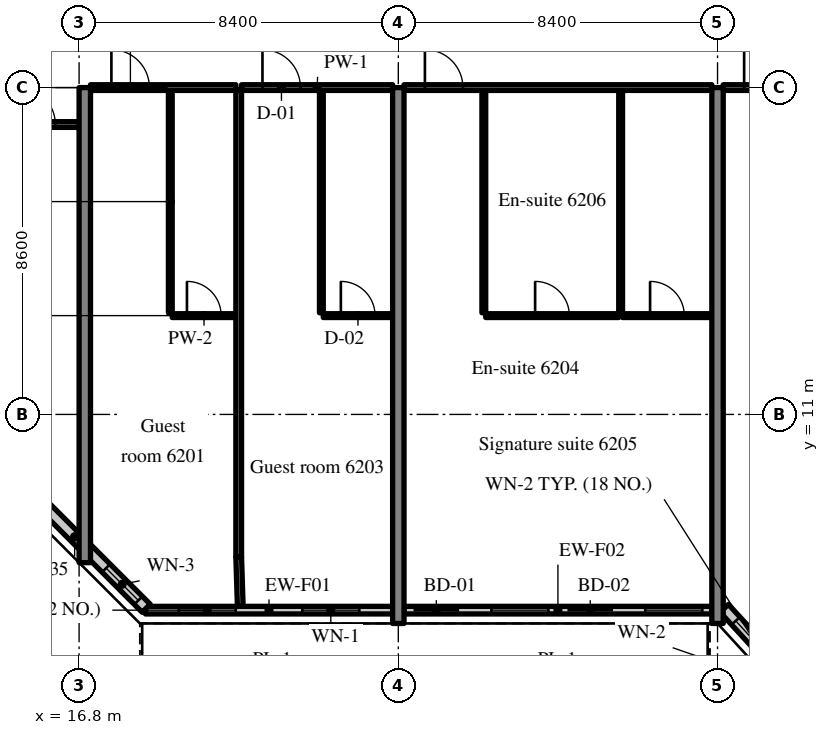
"""IFC4 building model, lengths in metres.
Left out: names, types, materials, properties, quantities, classifications, styles, units other than length and angle.
Written with IfcOpenShell. Run it as: python <this file> out.ifc"""

import sys

from ifc_helpers import new_model, si_unit, direction, frame, frame_2d, origin, place, context, subcontext, project, spatial, rectangle, extrude, source, transform, mapped, element, fill, save


model = new_model("IFC4")
c1 = context("Model", 3, precision=1e-05, world=origin(), true_north=direction((0.0, 1.0)))
c2 = subcontext(c1, "Body", "Model", "MODEL_VIEW")
j1 = project(units=[si_unit("LENGTHUNIT", "METRE"), si_unit("PLANEANGLEUNIT", "RADIAN")], contexts=[c1])
p1 = place(None, origin())
s1 = spatial("IfcSite", under=j1, at=p1, CompositionType="ELEMENT")
p2 = place(p1, origin())
s2 = spatial("IfcBuilding", under=s1, at=p2, CompositionType="ELEMENT")
p3 = place(p2, frame((0.0, 0.0, 256.9)))
s3 = spatial("IfcBuildingStorey", under=s2, at=p3, CompositionType="ELEMENT", Elevation=256.9)
m1 = source(origin(), c2, "Body", "SweptSolid", [
    extrude(rectangle(XDim=12.5, YDim=0.3, at=frame_2d((6.25, 0.0))), origin(), (0.0, 0.0, 1.0), 3.62),
])
p4 = place(p3, frame((16.95, 7.1, 0.0), z_axis=(0.0, 0.0, 1.0), x_axis=(0.0, 1.0, 0.0)))
e1 = element("IfcWall", 1, at=p4, inside=s3, PredefinedType="SHEAR", context=c2, shape_type="MappedRepresentation", body=[
    mapped(m1, transform((0.0, 0.0, 0.0), scale=1.0)),
])
m2 = source(origin(), c2, "Body", "SweptSolid", [
    extrude(rectangle(XDim=14.1, YDim=0.3, at=frame_2d((7.05, 0.0))), origin(), (0.0, 0.0, 1.0), 3.62),
])
for number, where, z_axis, x_axis in (
    (2, (25.2, 5.5, 0.0), (0.0, 0.0, 1.0), (0.0, 1.0, 0.0)),
    (3, (33.6, 5.5, 0.0), (0.0, 0.0, 1.0), (0.0, 1.0, 0.0)),
):
    element("IfcWall", number, at=place(p3, frame(where, z_axis=z_axis, x_axis=x_axis)), inside=s3, PredefinedType="SHEAR", context=c2, shape_type="MappedRepresentation", body=[
        mapped(m2, transform((0.0, 0.0, 0.0), scale=1.0)),
    ])
m3 = source(origin(), c2, "Body", "SweptSolid", [
    extrude(rectangle(XDim=6.505, YDim=0.2, at=frame_2d((3.252, 0.0))), origin(), (0.0, 0.0, 1.0), 3.02),
])
p5 = place(p3, frame((18.545, 5.85, 0.0), z_axis=(0.0, 0.0, 1.0), x_axis=(1.0, 0.0, 0.0)))
e4 = element("IfcWall", 4, at=p5, inside=s3, PredefinedType="SOLIDWALL", context=c2, shape_type="MappedRepresentation", body=[
    mapped(m3, transform((0.0, 0.0, 0.0), scale=1.0)),
])
m4 = source(origin(), c2, "Body", "SweptSolid", [
    extrude(rectangle(XDim=1.5, YDim=1.5, at=frame_2d((0.75, 0.75))), frame((0.0, 0.11, 0.0), z_axis=(0.0, -1.0, 0.0), x_axis=(1.0, 0.0, 0.0)), (0.0, 0.0, 1.0), 0.22),
])
p6 = place(p5, frame((0.876, 0.0, 0.9)))
e5 = element("IfcOpeningElement", 5, at=p6, cuts=e4, PredefinedType="OPENING", context=c2, shape_type="MappedRepresentation", body=[
    mapped(m4, transform((0.0, 0.0, 0.0), scale=1.0)),
])
p7 = place(p5, frame((4.129, 0.0, 0.9)))
e6 = element("IfcOpeningElement", 6, at=p7, cuts=e4, PredefinedType="OPENING", context=c2, shape_type="MappedRepresentation", body=[
    mapped(m4, transform((0.0, 0.0, 0.0), scale=1.0)),
])
m5 = source(origin(), c2, "Body", "SweptSolid", [
    extrude(rectangle(XDim=8.1, YDim=0.2, at=frame_2d((4.05, 0.0))), origin(), (0.0, 0.0, 1.0), 3.02),
])
p8 = place(p3, frame((25.35, 5.85, 0.0), z_axis=(0.0, 0.0, 1.0), x_axis=(1.0, 0.0, 0.0)))
e7 = element("IfcWall", 7, at=p8, inside=s3, PredefinedType="SOLIDWALL", context=c2, shape_type="MappedRepresentation", body=[
    mapped(m5, transform((0.0, 0.0, 0.0), scale=1.0)),
])
m6 = source(origin(), c2, "Body", "SweptSolid", [
    extrude(rectangle(XDim=1.2, YDim=2.4, at=frame_2d((0.6, 1.2))), frame((0.0, 0.11, 0.0), z_axis=(0.0, -1.0, 0.0), x_axis=(1.0, 0.0, 0.0)), (0.0, 0.0, 1.0), 0.22),
])
p9 = place(p8, frame((0.25, 0.0, 0.0)))
e8 = element("IfcOpeningElement", 8, at=p9, cuts=e7, PredefinedType="OPENING", context=c2, shape_type="MappedRepresentation", body=[
    mapped(m6, transform((0.0, 0.0, 0.0), scale=1.0)),
])
p10 = place(p8, frame((2.3, 0.0, 0.9)))
e9 = element("IfcOpeningElement", 9, at=p10, cuts=e7, PredefinedType="OPENING", context=c2, shape_type="MappedRepresentation", body=[
    mapped(m4, transform((0.0, 0.0, 0.0), scale=1.0)),
])
p11 = place(p8, frame((4.3, 0.0, 0.0)))
e10 = element("IfcOpeningElement", 10, at=p11, cuts=e7, PredefinedType="OPENING", context=c2, shape_type="MappedRepresentation", body=[
    mapped(m6, transform((0.0, 0.0, 0.0), scale=1.0)),
])
p12 = place(p8, frame((6.35, 0.0, 0.9)))
e11 = element("IfcOpeningElement", 11, at=p12, cuts=e7, PredefinedType="OPENING", context=c2, shape_type="MappedRepresentation", body=[
    mapped(m4, transform((0.0, 0.0, 0.0), scale=1.0)),
])
m7 = source(origin(), c2, "Body", "SweptSolid", [
    extrude(rectangle(XDim=2.398, YDim=0.3, at=frame_2d((1.199, 0.0))), origin(), (0.0, 0.0, 1.0), 3.62),
])
p13 = place(p3, frame((33.776, 5.9, 0.0), z_axis=(0.0, 0.0, 1.0), x_axis=(0.675374189419, -0.737475222815, 0.0)))
e12 = element("IfcWall", 12, at=p13, inside=s3, PredefinedType="SOLIDWALL", context=c2, shape_type="MappedRepresentation", body=[
    mapped(m7, transform((0.0, 0.0, 0.0), scale=1.0)),
])
m8 = source(origin(), c2, "Body", "SweptSolid", [
    extrude(rectangle(XDim=1.5, YDim=2.0, at=frame_2d((0.75, 1.0))), frame((0.0, 0.16, 0.0), z_axis=(0.0, -1.0, 0.0), x_axis=(1.0, 0.0, 0.0)), (0.0, 0.0, 1.0), 0.32),
])
p14 = place(p13, frame((0.449, 0.0, 0.9)))
e13 = element("IfcOpeningElement", 13, at=p14, cuts=e12, PredefinedType="OPENING", context=c2, shape_type="MappedRepresentation", body=[
    mapped(m8, transform((0.0, 0.0, 0.0), scale=1.0)),
])
m9 = source(origin(), c2, "Body", "SweptSolid", [
    extrude(rectangle(XDim=5.326, YDim=0.3, at=frame_2d((2.663, 0.0))), origin(), (0.0, 0.0, 1.0), 3.62),
])
p15 = place(p3, frame((14.8, 9.666, 0.0), z_axis=(0.0, 0.0, 1.0), x_axis=(0.707083859269, -0.707129702361, 0.0)))
e14 = element("IfcWall", 14, at=p15, inside=s3, PredefinedType="SOLIDWALL", context=c2, shape_type="MappedRepresentation", body=[
    mapped(m9, transform((0.0, 0.0, 0.0), scale=1.0)),
])
m10 = source(origin(), c2, "Body", "SweptSolid", [
    extrude(rectangle(XDim=1.2, YDim=1.5, at=frame_2d((0.6, 0.75))), frame((0.0, 0.16, 0.0), z_axis=(0.0, -1.0, 0.0), x_axis=(1.0, 0.0, 0.0)), (0.0, 0.0, 1.0), 0.32),
])
p16 = place(p15, frame((3.833, 0.0, 0.9)))
e15 = element("IfcOpeningElement", 15, at=p16, cuts=e14, PredefinedType="OPENING", context=c2, shape_type="MappedRepresentation", body=[
    mapped(m10, transform((0.0, 0.0, 0.0), scale=1.0)),
])
m11 = source(origin(), c2, "Body", "SweptSolid", [
    extrude(rectangle(XDim=5.85, YDim=0.1, at=frame_2d((2.925, 0.0))), origin(), (0.0, 0.0, 1.0), 3.62),
])
p17 = place(p3, frame((19.2, 13.675, 0.0), z_axis=(0.0, 0.0, 1.0), x_axis=(0.0, 1.0, 0.0)))
e16 = element("IfcWall", 16, at=p17, inside=s3, PredefinedType="PARTITIONING", context=c2, shape_type="MappedRepresentation", body=[
    mapped(m11, transform((0.0, 0.0, 0.0), scale=1.0)),
])
m12 = source(origin(), c2, "Body", "SweptSolid", [
    extrude(rectangle(XDim=1.675, YDim=0.1, at=frame_2d((0.837, 0.0))), origin(), (0.0, 0.0, 1.0), 3.62),
])
p18 = place(p3, frame((19.25, 13.6, 0.0), z_axis=(0.0, 0.0, 1.0), x_axis=(1.0, 0.0, 0.0)))
e17 = element("IfcWall", 17, at=p18, inside=s3, PredefinedType="PARTITIONING", context=c2, shape_type="MappedRepresentation", body=[
    mapped(m12, transform((0.0, 0.0, 0.0), scale=1.0)),
])
m13 = source(origin(), c2, "Body", "SweptSolid", [
    extrude(rectangle(XDim=0.9, YDim=2.1, at=frame_2d((0.45, 1.05))), frame((0.0, 0.06, 0.0), z_axis=(0.0, -1.0, 0.0), x_axis=(1.0, 0.0, 0.0)), (0.0, 0.0, 1.0), 0.12),
])
p19 = place(p18, frame((0.388, 0.0, 0.0)))
e18 = element("IfcOpeningElement", 18, at=p19, cuts=e17, PredefinedType="OPENING", context=c2, shape_type="MappedRepresentation", body=[
    mapped(m13, transform((0.0, 0.0, 0.0), scale=1.0)),
])
m14 = source(origin(), c2, "Body", "SweptSolid", [
    extrude(rectangle(XDim=3.825, YDim=0.15, at=frame_2d((1.913, 0.0))), origin(), (0.0, 0.0, 1.0), 2.92),
])
p20 = place(p3, frame((17.1, 19.6, 0.0), z_axis=(0.0, 0.0, 1.0), x_axis=(1.0, 0.0, 0.0)))
e19 = element("IfcWall", 19, at=p20, inside=s3, PredefinedType="PARTITIONING", context=c2, shape_type="MappedRepresentation", body=[
    mapped(m14, transform((0.0, 0.0, 0.0), scale=1.0)),
])
m15 = source(origin(), c2, "Body", "SweptSolid", [
    extrude(rectangle(XDim=1.0, YDim=2.1, at=frame_2d((0.5, 1.05))), frame((0.0, 0.085, 0.0), z_axis=(0.0, -1.0, 0.0), x_axis=(1.0, 0.0, 0.0)), (0.0, 0.0, 1.0), 0.17),
])
p21 = place(p20, frame((0.55, 0.0, 0.0)))
e20 = element("IfcOpeningElement", 20, at=p21, cuts=e19, PredefinedType="OPENING", context=c2, shape_type="MappedRepresentation", body=[
    mapped(m15, transform((0.0, 0.0, 0.0), scale=1.0)),
])
p22 = place(p3, frame((23.175, 13.675, 0.0), z_axis=(0.0, 0.0, 1.0), x_axis=(0.0, 1.0, 0.0)))
e21 = element("IfcWall", 21, at=p22, inside=s3, PredefinedType="PARTITIONING", context=c2, shape_type="MappedRepresentation", body=[
    mapped(m11, transform((0.0, 0.0, 0.0), scale=1.0)),
])
m16 = source(origin(), c2, "Body", "SweptSolid", [
    extrude(rectangle(XDim=1.825, YDim=0.1, at=frame_2d((0.913, 0.0))), origin(), (0.0, 0.0, 1.0), 3.62),
])
p23 = place(p3, frame((23.225, 13.6, 0.0), z_axis=(0.0, 0.0, 1.0), x_axis=(1.0, 0.0, 0.0)))
e22 = element("IfcWall", 22, at=p23, inside=s3, PredefinedType="PARTITIONING", context=c2, shape_type="MappedRepresentation", body=[
    mapped(m16, transform((0.0, 0.0, 0.0), scale=1.0)),
])
p24 = place(p23, frame((0.463, 0.0, 0.0)))
e23 = element("IfcOpeningElement", 23, at=p24, cuts=e22, PredefinedType="OPENING", context=c2, shape_type="MappedRepresentation", body=[
    mapped(m13, transform((0.0, 0.0, 0.0), scale=1.0)),
])
m17 = source(origin(), c2, "Body", "SweptSolid", [
    extrude(rectangle(XDim=3.975, YDim=0.15, at=frame_2d((1.988, 0.0))), origin(), (0.0, 0.0, 1.0), 2.92),
])
p25 = place(p3, frame((21.075, 19.6, 0.0), z_axis=(0.0, 0.0, 1.0), x_axis=(1.0, 0.0, 0.0)))
e24 = element("IfcWall", 24, at=p25, inside=s3, PredefinedType="PARTITIONING", context=c2, shape_type="MappedRepresentation", body=[
    mapped(m17, transform((0.0, 0.0, 0.0), scale=1.0)),
])
p26 = place(p25, frame((0.55, 0.0, 0.0)))
e25 = element("IfcOpeningElement", 25, at=p26, cuts=e24, PredefinedType="OPENING", context=c2, shape_type="MappedRepresentation", body=[
    mapped(m15, transform((0.0, 0.0, 0.0), scale=1.0)),
])
m18 = source(origin(), c2, "Body", "SweptSolid", [
    extrude(rectangle(XDim=12.275, YDim=0.15, at=frame_2d((6.137, 0.0))), origin(), (0.0, 0.0, 1.0), 3.62),
])
p27 = place(p3, frame((21.0, 7.25, 0.0), z_axis=(0.0, 0.0, 1.0), x_axis=(0.0, 1.0, 0.0)))
e26 = element("IfcWall", 26, at=p27, inside=s3, PredefinedType="PARTITIONING", context=c2, shape_type="MappedRepresentation", body=[
    mapped(m18, transform((0.0, 0.0, 0.0), scale=1.0)),
])
for number, where, z_axis, x_axis in (
    (27, (27.45, 13.675, 0.0), (0.0, 0.0, 1.0), (0.0, 1.0, 0.0)),
    (28, (31.05, 13.675, 0.0), (0.0, 0.0, 1.0), (0.0, 1.0, 0.0)),
):
    element("IfcWall", number, at=place(p3, frame(where, z_axis=z_axis, x_axis=x_axis)), inside=s3, PredefinedType="PARTITIONING", context=c2, shape_type="MappedRepresentation", body=[
        mapped(m11, transform((0.0, 0.0, 0.0), scale=1.0)),
    ])
m19 = source(origin(), c2, "Body", "SweptSolid", [
    extrude(rectangle(XDim=3.5, YDim=0.1, at=frame_2d((1.75, 0.0))), origin(), (0.0, 0.0, 1.0), 3.62),
])
p28 = place(p3, frame((27.5, 13.6, 0.0), z_axis=(0.0, 0.0, 1.0), x_axis=(1.0, 0.0, 0.0)))
e29 = element("IfcWall", 29, at=p28, inside=s3, PredefinedType="PARTITIONING", context=c2, shape_type="MappedRepresentation", body=[
    mapped(m19, transform((0.0, 0.0, 0.0), scale=1.0)),
])
p29 = place(p28, frame((1.3, 0.0, 0.0)))
e30 = element("IfcOpeningElement", 30, at=p29, cuts=e29, PredefinedType="OPENING", context=c2, shape_type="MappedRepresentation", body=[
    mapped(m13, transform((0.0, 0.0, 0.0), scale=1.0)),
])
m20 = source(origin(), c2, "Body", "SweptSolid", [
    extrude(rectangle(XDim=2.35, YDim=0.1, at=frame_2d((1.175, 0.0))), origin(), (0.0, 0.0, 1.0), 3.62),
])
p30 = place(p3, frame((31.1, 13.6, 0.0), z_axis=(0.0, 0.0, 1.0), x_axis=(1.0, 0.0, 0.0)))
e31 = element("IfcWall", 31, at=p30, inside=s3, PredefinedType="PARTITIONING", context=c2, shape_type="MappedRepresentation", body=[
    mapped(m20, transform((0.0, 0.0, 0.0), scale=1.0)),
])
p31 = place(p30, frame((0.725, 0.0, 0.0)))
e32 = element("IfcOpeningElement", 32, at=p31, cuts=e31, PredefinedType="OPENING", context=c2, shape_type="MappedRepresentation", body=[
    mapped(m13, transform((0.0, 0.0, 0.0), scale=1.0)),
])
m21 = source(origin(), c2, "Body", "SweptSolid", [
    extrude(rectangle(XDim=8.1, YDim=0.15, at=frame_2d((4.05, 0.0))), origin(), (0.0, 0.0, 1.0), 2.92),
])
p32 = place(p3, frame((25.35, 19.6, 0.0), z_axis=(0.0, 0.0, 1.0), x_axis=(1.0, 0.0, 0.0)))
e33 = element("IfcWall", 33, at=p32, inside=s3, PredefinedType="PARTITIONING", context=c2, shape_type="MappedRepresentation", body=[
    mapped(m21, transform((0.0, 0.0, 0.0), scale=1.0)),
])
p33 = place(p32, frame((0.55, 0.0, 0.0)))
e34 = element("IfcOpeningElement", 34, at=p33, cuts=e33, PredefinedType="OPENING", context=c2, shape_type="MappedRepresentation", body=[
    mapped(m15, transform((0.0, 0.0, 0.0), scale=1.0)),
])
m22 = source(origin(), c2, "Body", "SweptSolid", [
    extrude(rectangle(XDim=8.1, YDim=0.15, at=frame_2d((4.05, 0.0))), origin(), (0.0, 0.0, 1.0), 2.92),
])
p34 = place(p3, frame((33.75, 19.6, 0.0), z_axis=(0.0, 0.0, 1.0), x_axis=(1.0, 0.0, 0.0)))
e35 = element("IfcWall", 35, at=p34, inside=s3, PredefinedType="PARTITIONING", context=c2, shape_type="MappedRepresentation", body=[
    mapped(m22, transform((0.0, 0.0, 0.0), scale=1.0)),
])
p35 = place(p34, frame((0.55, 0.0, 0.0)))
e36 = element("IfcOpeningElement", 36, at=p35, cuts=e35, PredefinedType="OPENING", context=c2, shape_type="MappedRepresentation", body=[
    mapped(m15, transform((0.0, 0.0, 0.0), scale=1.0)),
])
m23 = source(origin(), c2, "Body", "SweptSolid", [
    extrude(rectangle(XDim=1.9, YDim=0.15, at=frame_2d((0.95, 0.0))), origin(), (0.0, 0.0, 1.0), 2.92),
])
p36 = place(p3, frame((14.9, 18.628, 0.0), z_axis=(0.0, 0.0, 1.0), x_axis=(1.0, 0.0, 0.0)))
e37 = element("IfcWall", 37, at=p36, inside=s3, PredefinedType="PARTITIONING", context=c2, shape_type="MappedRepresentation", body=[
    mapped(m23, transform((0.0, 0.0, 0.0), scale=1.0)),
])
p37 = place(p36, frame((0.275, 0.0, 0.0)))
e38 = element("IfcOpeningElement", 38, at=p37, cuts=e37, PredefinedType="OPENING", context=c2, shape_type="MappedRepresentation", body=[
    mapped(m15, transform((0.0, 0.0, 0.0), scale=1.0)),
])
m24 = source(origin(), c2, "Body", "SweptSolid", [
    extrude(rectangle(XDim=1.301, YDim=0.15, at=frame_2d((0.65, 0.0))), origin(), (0.0, 0.0, 1.0), 3.62),
])
p38 = place(p3, frame((21.041, 5.95, 0.0), z_axis=(0.0, 0.0, 1.0), x_axis=(-0.031533606063, 0.999502692187, 0.0)))
e39 = element("IfcWall", 39, at=p38, inside=s3, PredefinedType="PARTITIONING", context=c2, shape_type="MappedRepresentation", body=[
    mapped(m24, transform((0.0, 0.0, 0.0), scale=1.0)),
])
m25 = source(origin(), c2, "Body", "SweptSolid", [
    extrude(rectangle(XDim=1.5, YDim=1.5, at=frame_2d((0.75, 0.75))), frame((0.0, 0.03, 0.0), z_axis=(0.0, -1.0, 0.0), x_axis=(1.0, 0.0, 0.0)), (0.0, 0.0, 1.0), 0.06),
])
p39 = place(p6, origin())
e40 = element("IfcWindow", 40, at=p39, inside=s3, PartitioningType="SINGLE_PANEL", PredefinedType="WINDOW", context=c2, shape_type="MappedRepresentation", body=[
    mapped(m25, transform((0.0, 0.0, 0.0), scale=1.0)),
])
fill(e5, e40)
p40 = place(p7, origin())
e41 = element("IfcWindow", 41, at=p40, inside=s3, PartitioningType="SINGLE_PANEL", PredefinedType="WINDOW", context=c2, shape_type="MappedRepresentation", body=[
    mapped(m25, transform((0.0, 0.0, 0.0), scale=1.0)),
])
fill(e6, e41)
m26 = source(origin(), c2, "Body", "SweptSolid", [
    extrude(rectangle(XDim=1.2, YDim=2.4, at=frame_2d((0.6, 1.2))), frame((0.0, 0.025, 0.0), z_axis=(0.0, -1.0, 0.0), x_axis=(1.0, 0.0, 0.0)), (0.0, 0.0, 1.0), 0.05),
])
p41 = place(p9, origin())
e42 = element("IfcDoor", 42, at=p41, inside=s3, OperationType="SLIDING_TO_LEFT", PredefinedType="DOOR", context=c2, shape_type="MappedRepresentation", body=[
    mapped(m26, transform((0.0, 0.0, 0.0), scale=1.0)),
])
fill(e8, e42)
p42 = place(p10, origin())
e43 = element("IfcWindow", 43, at=p42, inside=s3, PartitioningType="SINGLE_PANEL", PredefinedType="WINDOW", context=c2, shape_type="MappedRepresentation", body=[
    mapped(m25, transform((0.0, 0.0, 0.0), scale=1.0)),
])
fill(e9, e43)
p43 = place(p11, origin())
e44 = element("IfcDoor", 44, at=p43, inside=s3, OperationType="SLIDING_TO_RIGHT", PredefinedType="DOOR", context=c2, shape_type="MappedRepresentation", body=[
    mapped(m26, transform((0.0, 0.0, 0.0), scale=1.0)),
])
fill(e10, e44)
p44 = place(p12, origin())
e45 = element("IfcWindow", 45, at=p44, inside=s3, PartitioningType="SINGLE_PANEL", PredefinedType="WINDOW", context=c2, shape_type="MappedRepresentation", body=[
    mapped(m25, transform((0.0, 0.0, 0.0), scale=1.0)),
])
fill(e11, e45)
m27 = source(origin(), c2, "Body", "SweptSolid", [
    extrude(rectangle(XDim=1.5, YDim=2.0, at=frame_2d((0.75, 1.0))), frame((0.0, 0.03, 0.0), z_axis=(0.0, -1.0, 0.0), x_axis=(1.0, 0.0, 0.0)), (0.0, 0.0, 1.0), 0.06),
])
p45 = place(p14, origin())
e46 = element("IfcWindow", 46, at=p45, inside=s3, PartitioningType="SINGLE_PANEL", PredefinedType="WINDOW", context=c2, shape_type="MappedRepresentation", body=[
    mapped(m27, transform((0.0, 0.0, 0.0), scale=1.0)),
])
fill(e13, e46)
m28 = source(origin(), c2, "Body", "SweptSolid", [
    extrude(rectangle(XDim=1.2, YDim=1.5, at=frame_2d((0.6, 0.75))), frame((0.0, 0.03, 0.0), z_axis=(0.0, -1.0, 0.0), x_axis=(1.0, 0.0, 0.0)), (0.0, 0.0, 1.0), 0.06),
])
p46 = place(p16, origin())
e47 = element("IfcWindow", 47, at=p46, inside=s3, PartitioningType="SINGLE_PANEL", PredefinedType="WINDOW", context=c2, shape_type="MappedRepresentation", body=[
    mapped(m28, transform((0.0, 0.0, 0.0), scale=1.0)),
])
fill(e15, e47)
m29 = source(origin(), c2, "Body", "SweptSolid", [
    extrude(rectangle(XDim=0.9, YDim=2.1, at=frame_2d((0.45, 1.05))), frame((0.0, 0.025, 0.0), z_axis=(0.0, -1.0, 0.0), x_axis=(1.0, 0.0, 0.0)), (0.0, 0.0, 1.0), 0.05),
])
p47 = place(p19, origin())
e48 = element("IfcDoor", 48, at=p47, inside=s3, OperationType="SINGLE_SWING_LEFT", PredefinedType="DOOR", context=c2, shape_type="MappedRepresentation", body=[
    mapped(m29, transform((0.0, 0.0, 0.0), scale=1.0)),
])
fill(e18, e48)
m30 = source(origin(), c2, "Body", "SweptSolid", [
    extrude(rectangle(XDim=1.0, YDim=2.1, at=frame_2d((0.5, 1.05))), frame((0.0, 0.025, 0.0), z_axis=(0.0, -1.0, 0.0), x_axis=(1.0, 0.0, 0.0)), (0.0, 0.0, 1.0), 0.05),
])
p48 = place(p21, origin())
e49 = element("IfcDoor", 49, at=p48, inside=s3, OperationType="SINGLE_SWING_LEFT", PredefinedType="DOOR", context=c2, shape_type="MappedRepresentation", body=[
    mapped(m30, transform((0.0, 0.0, 0.0), scale=1.0)),
])
fill(e20, e49)
p49 = place(p24, origin())
e50 = element("IfcDoor", 50, at=p49, inside=s3, OperationType="SINGLE_SWING_LEFT", PredefinedType="DOOR", context=c2, shape_type="MappedRepresentation", body=[
    mapped(m29, transform((0.0, 0.0, 0.0), scale=1.0)),
])
fill(e23, e50)
p50 = place(p26, origin())
e51 = element("IfcDoor", 51, at=p50, inside=s3, OperationType="SINGLE_SWING_LEFT", PredefinedType="DOOR", context=c2, shape_type="MappedRepresentation", body=[
    mapped(m30, transform((0.0, 0.0, 0.0), scale=1.0)),
])
fill(e25, e51)
p51 = place(p29, origin())
e52 = element("IfcDoor", 52, at=p51, inside=s3, OperationType="SINGLE_SWING_LEFT", PredefinedType="DOOR", context=c2, shape_type="MappedRepresentation", body=[
    mapped(m29, transform((0.0, 0.0, 0.0), scale=1.0)),
])
fill(e30, e52)
p52 = place(p31, origin())
e53 = element("IfcDoor", 53, at=p52, inside=s3, OperationType="SINGLE_SWING_LEFT", PredefinedType="DOOR", context=c2, shape_type="MappedRepresentation", body=[
    mapped(m29, transform((0.0, 0.0, 0.0), scale=1.0)),
])
fill(e32, e53)
p53 = place(p33, origin())
e54 = element("IfcDoor", 54, at=p53, inside=s3, OperationType="SINGLE_SWING_LEFT", PredefinedType="DOOR", context=c2, shape_type="MappedRepresentation", body=[
    mapped(m30, transform((0.0, 0.0, 0.0), scale=1.0)),
])
fill(e34, e54)
p54 = place(p35, origin())
e55 = element("IfcDoor", 55, at=p54, inside=s3, OperationType="SINGLE_SWING_LEFT", PredefinedType="DOOR", context=c2, shape_type="MappedRepresentation", body=[
    mapped(m30, transform((0.0, 0.0, 0.0), scale=1.0)),
])
fill(e36, e55)
p55 = place(p37, origin())
e56 = element("IfcDoor", 56, at=p55, inside=s3, OperationType="SINGLE_SWING_LEFT", PredefinedType="DOOR", context=c2, shape_type="MappedRepresentation", body=[
    mapped(m30, transform((0.0, 0.0, 0.0), scale=1.0)),
])
fill(e38, e56)
save(model, sys.argv[1])
